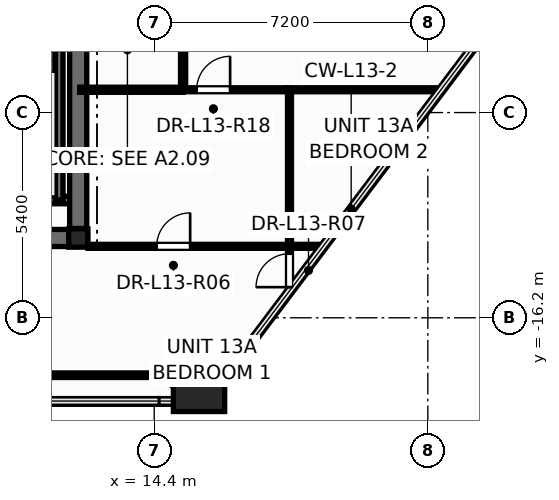
"""IFC4 building model, lengths in metres.
Left out: names, types, materials, properties, quantities, classifications, styles, units other than length and angle.
Written with IfcOpenShell. Run it as: python <this file> out.ifc"""

import sys

from ifc_helpers import new_model, si_unit, direction, frame, frame_2d, origin, origin_2d, place, context, subcontext, project, spatial, rectangle, hollow_rectangle, i_section, extrude, element, fill, save


model = new_model("IFC4")
c1 = context("Model", 3, precision=1e-05, world=origin(), true_north=direction((0.0, 1.0)))
c2 = subcontext(c1, "Body", "Model", "MODEL_VIEW")
j1 = project(units=[si_unit("LENGTHUNIT", "METRE"), si_unit("PLANEANGLEUNIT", "RADIAN")], contexts=[c1])
p1 = place(None, origin())
s1 = spatial("IfcSite", under=j1, at=p1, CompositionType="ELEMENT")
p2 = place(p1, origin())
s2 = spatial("IfcBuilding", under=s1, at=p2, CompositionType="ELEMENT")
p3 = place(p2, frame((0.0, 0.0, 53.1)))
s3 = spatial("IfcBuildingStorey", under=s2, at=p3, CompositionType="ELEMENT", Elevation=53.1)
p4 = place(p3, frame((15.58, -17.991, 0.0), z_axis=(0.0, 0.0, 1.0), x_axis=(1.0, 0.0, 0.0)))
e1 = element("IfcColumn", 1, at=p4, inside=s3, PredefinedType="COLUMN", context=c2, shape_type="SweptSolid", body=[
    extrude(hollow_rectangle(XDim=1.35, YDim=1.35, WallThickness=0.065, at=origin_2d()), origin(), (0.0, 0.0, 1.0), 3.6),
])
p5 = place(p3, frame((12.4, -14.1, 0.0), z_axis=(0.0, 0.0, 1.0), x_axis=(1.0, 0.0, 0.0)))
e2 = element("IfcColumn", 2, at=p5, inside=s3, PredefinedType="COLUMN", context=c2, shape_type="SweptSolid", body=[
    extrude(i_section(OverallWidth=0.5, OverallDepth=0.482, WebThickness=0.04, FlangeThickness=0.045, at=origin_2d()), origin(), (0.0, 0.0, 1.0), 3.6),
])
p6 = place(p3, frame((-12.65, -14.1, 0.0), z_axis=(0.0, 0.0, 1.0), x_axis=(1.0, 0.0, 0.0)))
e3 = element("IfcWall", 3, at=p6, inside=s3, PredefinedType="SHEAR", context=c2, shape_type="SweptSolid", body=[
    extrude(rectangle(XDim=25.3, YDim=0.45, at=frame_2d((12.65, 0.0))), origin(), (0.0, 0.0, 1.0), 3.6),
])
p7 = place(p3, frame((8.48, -13.1, 0.0), z_axis=(0.0, 0.0, 1.0), x_axis=(1.0, 0.0, 0.0)))
e4 = element("IfcWall", 4, at=p7, inside=s3, PredefinedType="SOLIDWALL", context=c2, shape_type="SweptSolid", body=[
    extrude(rectangle(XDim=3.87, YDim=0.2, at=frame_2d((1.935, 0.0))), origin(), (0.0, 0.0, 1.0), 3.6),
])
p8 = place(p3, frame((11.9, -13.1, 0.0), z_axis=(0.0, 0.0, 1.0), x_axis=(0.0, 1.0, 0.0)))
e5 = element("IfcWall", 5, at=p8, inside=s3, PredefinedType="SOLIDWALL", context=c2, shape_type="SweptSolid", body=[
    extrude(rectangle(XDim=7.58, YDim=0.2, at=frame_2d((3.79, 0.0))), origin(), (0.0, 0.0, 1.0), 3.6),
])
p9 = place(p3, frame((12.4, -13.85, 0.0), z_axis=(0.0, 0.0, 1.0), x_axis=(0.0, 1.0, 0.0)))
e6 = element("IfcWall", 6, at=p9, inside=s3, PredefinedType="SHEAR", context=c2, shape_type="SweptSolid", body=[
    extrude(rectangle(XDim=9.4, YDim=0.45, at=frame_2d((4.7, 0.0))), origin(), (0.0, 0.0, 1.0), 3.6),
])
p10 = place(p3, frame((12.66, -14.32, 0.0), z_axis=(0.0, 0.0, 1.0), x_axis=(1.0, 0.0, 0.0)))
e7 = element("IfcWall", 7, at=p10, inside=s3, PredefinedType="PARTITIONING", context=c2, shape_type="SweptSolid", body=[
    extrude(rectangle(XDim=6.184, YDim=0.105, at=frame_2d((3.092, 0.0))), origin(), (0.0, 0.0, 1.0), 2.713),
])
p11 = place(p10, frame((1.805, 0.0, 0.0)))
e8 = element("IfcOpeningElement", 8, at=p11, cuts=e7, PredefinedType="OPENING", context=c2, shape_type="SweptSolid", body=[
    extrude(rectangle(XDim=0.886, YDim=2.104, at=frame_2d((0.44, 1.052))), frame((0.0, 0.062, 0.0), z_axis=(0.0, -1.0, 0.0), x_axis=(1.0, 0.0, 0.0)), (0.0, 0.0, 1.0), 0.125),
])
p12 = place(p3, frame((17.96, -15.494, 0.0), z_axis=(0.0, 0.0, 1.0), x_axis=(0.0, 1.0, 0.0)))
e9 = element("IfcWall", 9, at=p12, inside=s3, PredefinedType="PARTITIONING", context=c2, shape_type="SweptSolid", body=[
    extrude(rectangle(XDim=5.294, YDim=0.105, at=frame_2d((2.647, 0.0))), origin(), (0.0, 0.0, 1.0), 2.713),
])
p13 = place(p12, frame((0.1, 0.0, 0.0)))
e10 = element("IfcOpeningElement", 10, at=p13, cuts=e9, PredefinedType="OPENING", context=c2, shape_type="SweptSolid", body=[
    extrude(rectangle(XDim=0.886, YDim=2.104, at=frame_2d((0.44, 1.052))), frame((0.0, 0.062, 0.0), z_axis=(0.0, -1.0, 0.0), x_axis=(1.0, 0.0, 0.0)), (0.0, 0.0, 1.0), 0.125),
])
p14 = place(p3, frame((17.9, -10.2, 0.0), z_axis=(0.0, 0.0, 1.0), x_axis=(1.0, 0.0, 0.0)))
e11 = element("IfcWall", 11, at=p14, inside=s3, PredefinedType="PARTITIONING", context=c2, shape_type="SweptSolid", body=[
    extrude(rectangle(XDim=4.046, YDim=0.105, at=frame_2d((2.023, 0.0))), origin(), (0.0, 0.0, 1.0), 2.713),
])
p15 = place(p3, frame((10.707, -17.711, 0.0), z_axis=(0.0, 0.0, 1.0), x_axis=(1.0, 0.0, 0.0)))
e12 = element("IfcWall", 12, at=p15, inside=s3, PredefinedType="PARTITIONING", context=c2, shape_type="SweptSolid", body=[
    extrude(rectangle(XDim=3.959, YDim=0.12, at=frame_2d((1.979, 0.0))), origin(), (0.0, 0.0, 1.0), 3.35),
])
p16 = place(p3, frame((15.16, -10.2, 0.0), z_axis=(0.0, 0.0, 1.0), x_axis=(1.0, 0.0, 0.0)))
e13 = element("IfcWall", 13, at=p16, inside=s3, PredefinedType="PARTITIONING", context=c2, shape_type="SweptSolid", body=[
    extrude(rectangle(XDim=2.738, YDim=0.105, at=frame_2d((1.369, 0.0))), origin(), (0.0, 0.0, 1.0), 3.35),
])
p17 = place(p16, frame((0.357, 0.0, 0.0)))
e14 = element("IfcOpeningElement", 14, at=p17, cuts=e13, PredefinedType="OPENING", context=c2, shape_type="SweptSolid", body=[
    extrude(rectangle(XDim=0.886, YDim=2.104, at=frame_2d((0.44, 1.052))), frame((0.0, 0.062, 0.0), z_axis=(0.0, -1.0, 0.0), x_axis=(1.0, 0.0, 0.0)), (0.0, 0.0, 1.0), 0.125),
])
p18 = place(p3, frame((15.16, -10.2, 0.0), z_axis=(0.0, 0.0, 1.0), x_axis=(0.0, 1.0, 0.0)))
e15 = element("IfcWall", 15, at=p18, inside=s3, PredefinedType="PARTITIONING", context=c2, shape_type="SweptSolid", body=[
    extrude(rectangle(XDim=2.76, YDim=0.135, at=frame_2d((1.38, 0.0))), origin(), (0.0, 0.0, 1.0), 3.35),
])
p19 = place(p3, frame((12.44, -10.2, 0.0), z_axis=(0.0, 0.0, 1.0), x_axis=(1.0, 0.0, 0.0)))
e16 = element("IfcWall", 16, at=p19, inside=s3, PredefinedType="PARTITIONING", context=c2, shape_type="SweptSolid", body=[
    extrude(rectangle(XDim=2.72, YDim=0.135, at=frame_2d((1.36, 0.0))), origin(), (0.0, 0.0, 1.0), 2.713),
])
p20 = place(p3, frame((14.666, -17.711, 0.0), z_axis=(0.0, 0.0, 1.0), x_axis=(0.712544720488, -0.701626696545, 0.0)))
e17 = element("IfcWall", 17, at=p20, inside=s3, PredefinedType="PARTITIONING", context=c2, shape_type="SweptSolid", body=[
    extrude(rectangle(XDim=0.85, YDim=0.12, at=frame_2d((0.425, 0.0))), origin(), (0.0, 0.0, 1.0), 2.713),
])
p21 = place(p11, origin())
e18 = element("IfcDoor", 18, at=p21, inside=s3, OperationType="SINGLE_SWING_RIGHT", PredefinedType="DOOR", context=c2, shape_type="SweptSolid", body=[
    extrude(rectangle(XDim=0.88, YDim=2.1, at=frame_2d((0.44, 1.05))), frame((0.0, 0.025, 0.0), z_axis=(0.0, -1.0, 0.0), x_axis=(1.0, 0.0, 0.0)), (0.0, 0.0, 1.0), 0.05),
])
fill(e8, e18)
p22 = place(p13, origin())
e19 = element("IfcDoor", 19, at=p22, inside=s3, OperationType="SINGLE_SWING_LEFT", PredefinedType="DOOR", context=c2, shape_type="SweptSolid", body=[
    extrude(rectangle(XDim=0.88, YDim=2.1, at=frame_2d((0.44, 1.05))), frame((0.0, 0.025, 0.0), z_axis=(0.0, -1.0, 0.0), x_axis=(1.0, 0.0, 0.0)), (0.0, 0.0, 1.0), 0.05),
])
fill(e10, e19)
p23 = place(p17, origin())
e20 = element("IfcDoor", 20, at=p23, inside=s3, OperationType="SINGLE_SWING_RIGHT", PredefinedType="DOOR", context=c2, shape_type="SweptSolid", body=[
    extrude(rectangle(XDim=0.88, YDim=2.1, at=frame_2d((0.44, 1.05))), frame((0.0, 0.025, 0.0), z_axis=(0.0, -1.0, 0.0), x_axis=(1.0, 0.0, 0.0)), (0.0, 0.0, 1.0), 0.05),
])
fill(e14, e20)
save(model, sys.argv[1])
